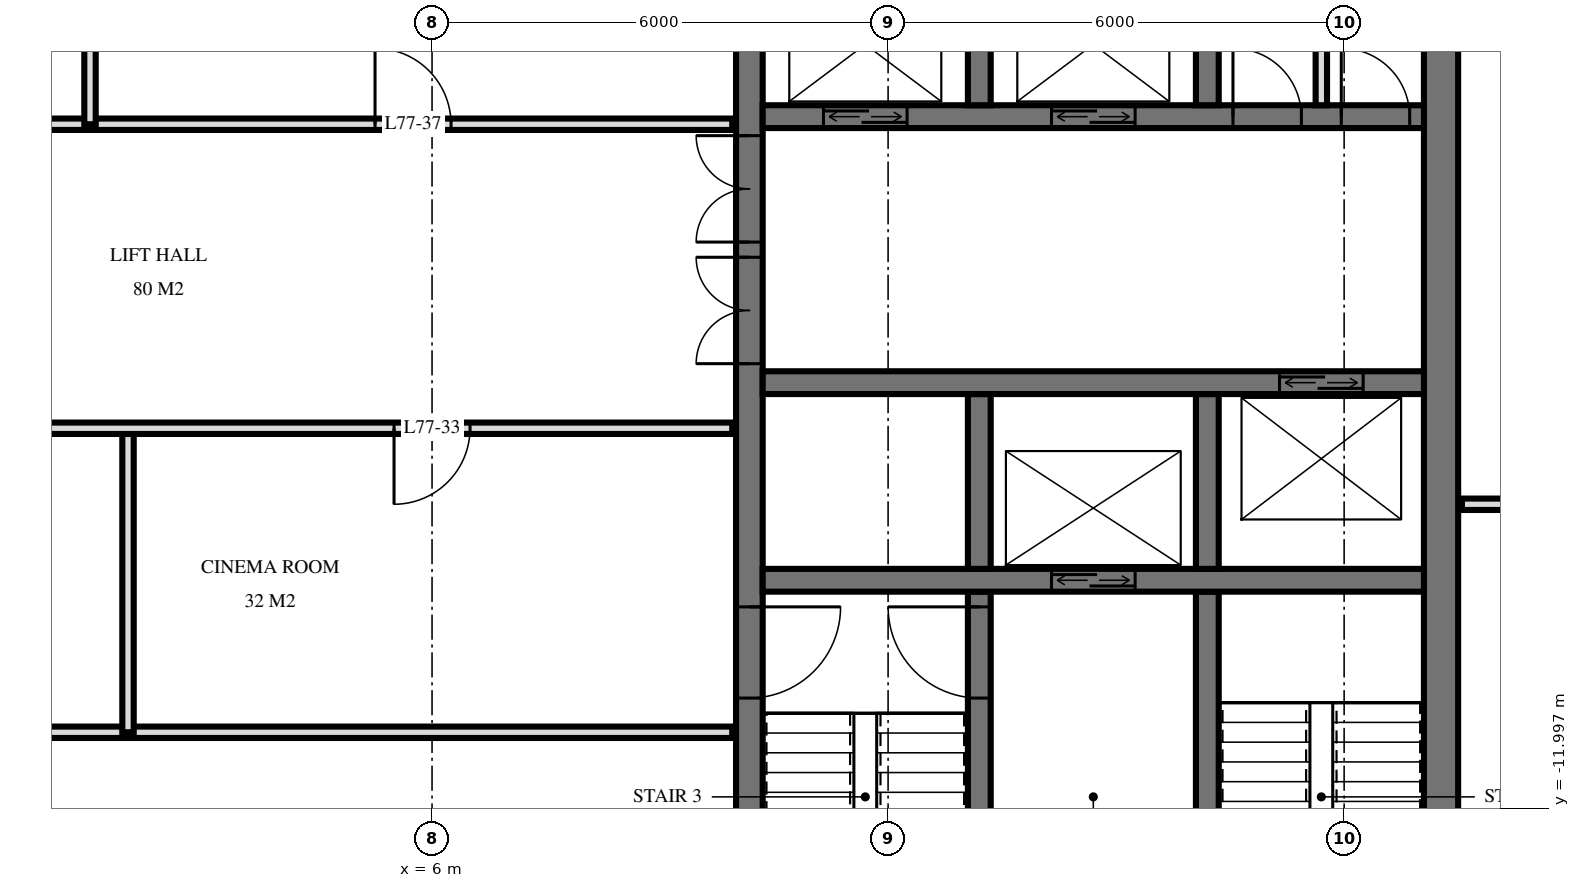
"""IFC4 building model, lengths in metres.
Left out: names, types, materials, properties, quantities, classifications, styles, units other than length and angle.
Written with IfcOpenShell. Run it as: python <this file> out.ifc"""

import sys

from ifc_helpers import new_model, si_unit, direction, frame, frame_2d, origin, place, context, subcontext, project, spatial, rectangle, extrude, element, fill, save


model = new_model("IFC4")
c1 = context("Model", 3, precision=1e-05, world=origin(), true_north=direction((0.0, 1.0)))
c2 = subcontext(c1, "Body", "Model", "MODEL_VIEW")
j1 = project(units=[si_unit("LENGTHUNIT", "METRE"), si_unit("PLANEANGLEUNIT", "RADIAN")], contexts=[c1])
p1 = place(None, origin())
s1 = spatial("IfcSite", under=j1, at=p1, CompositionType="ELEMENT")
p2 = place(p1, origin())
s2 = spatial("IfcBuilding", under=s1, at=p2, CompositionType="ELEMENT")
p3 = place(p2, frame((0.0, 0.0, 291.1)))
s3 = spatial("IfcBuildingStorey", under=s2, at=p3, CompositionType="ELEMENT", Elevation=291.1)
p4 = place(p3, frame((10.175, -14.55, 0.0), z_axis=(0.0, 0.0, 1.0), x_axis=(0.0, 1.0, 0.0)))
e1 = element("IfcWall", 1, at=p4, inside=s3, PredefinedType="SHEAR", context=c2, shape_type="SweptSolid", body=[
    extrude(rectangle(XDim=14.1, YDim=0.35, at=frame_2d((7.05, 0.0))), origin(), (0.0, 0.0, 1.0), 3.5),
])
p5 = place(p4, frame((8.4, 0.0, 0.0)))
e2 = element("IfcOpeningElement", 2, at=p5, cuts=e1, PredefinedType="OPENING", context=c2, shape_type="SweptSolid", body=[
    extrude(rectangle(XDim=1.4, YDim=2.4, at=frame_2d((0.7, 1.2))), frame((0.0, 0.185, 0.0), z_axis=(0.0, -1.0, 0.0), x_axis=(1.0, 0.0, 0.0)), (0.0, 0.0, 1.0), 0.37),
])
p6 = place(p4, frame((10.0, 0.0, 0.0)))
e3 = element("IfcOpeningElement", 3, at=p6, cuts=e1, PredefinedType="OPENING", context=c2, shape_type="SweptSolid", body=[
    extrude(rectangle(XDim=1.4, YDim=2.4, at=frame_2d((0.7, 1.2))), frame((0.0, 0.185, 0.0), z_axis=(0.0, -1.0, 0.0), x_axis=(1.0, 0.0, 0.0)), (0.0, 0.0, 1.0), 0.37),
])
p7 = place(p4, frame((4.0, 0.0, 0.0)))
e4 = element("IfcOpeningElement", 4, at=p7, cuts=e1, PredefinedType="OPENING", context=c2, shape_type="SweptSolid", body=[
    extrude(rectangle(XDim=1.2, YDim=2.1, at=frame_2d((0.6, 1.05))), frame((0.0, 0.185, 0.0), z_axis=(0.0, -1.0, 0.0), x_axis=(1.0, 0.0, 0.0)), (0.0, 0.0, 1.0), 0.37),
])
p8 = place(p3, frame((19.275, -14.55, 0.0), z_axis=(0.0, 0.0, 1.0), x_axis=(0.0, 1.0, 0.0)))
e5 = element("IfcWall", 5, at=p8, inside=s3, PredefinedType="SHEAR", context=c2, shape_type="SweptSolid", body=[
    extrude(rectangle(XDim=14.1, YDim=0.45, at=frame_2d((7.05, 0.0))), origin(), (0.0, 0.0, 1.0), 3.5),
])
p9 = place(p3, frame((10.35, -2.9, 0.0), z_axis=(0.0, 0.0, 1.0), x_axis=(1.0, 0.0, 0.0)))
e6 = element("IfcWall", 6, at=p9, inside=s3, PredefinedType="SHEAR", context=c2, shape_type="SweptSolid", body=[
    extrude(rectangle(XDim=8.7, YDim=0.3, at=frame_2d((4.35, 0.0))), origin(), (0.0, 0.0, 1.0), 3.5),
])
p10 = place(p9, frame((0.8, 0.0, 0.0)))
e7 = element("IfcOpeningElement", 7, at=p10, cuts=e6, PredefinedType="OPENING", context=c2, shape_type="SweptSolid", body=[
    extrude(rectangle(XDim=1.1, YDim=2.1, at=frame_2d((0.55, 1.05))), frame((0.0, 0.16, 0.0), z_axis=(0.0, -1.0, 0.0), x_axis=(1.0, 0.0, 0.0)), (0.0, 0.0, 1.0), 0.32),
])
p11 = place(p9, frame((3.8, 0.0, 0.0)))
e8 = element("IfcOpeningElement", 8, at=p11, cuts=e6, PredefinedType="OPENING", context=c2, shape_type="SweptSolid", body=[
    extrude(rectangle(XDim=1.1, YDim=2.1, at=frame_2d((0.55, 1.05))), frame((0.0, 0.16, 0.0), z_axis=(0.0, -1.0, 0.0), x_axis=(1.0, 0.0, 0.0)), (0.0, 0.0, 1.0), 0.32),
])
p12 = place(p9, frame((6.188, 0.0, 0.0)))
e9 = element("IfcOpeningElement", 9, at=p12, cuts=e6, PredefinedType="OPENING", context=c2, shape_type="SweptSolid", body=[
    extrude(rectangle(XDim=0.9, YDim=2.1, at=frame_2d((0.45, 1.05))), frame((0.0, 0.16, 0.0), z_axis=(0.0, -1.0, 0.0), x_axis=(1.0, 0.0, 0.0)), (0.0, 0.0, 1.0), 0.32),
])
p13 = place(p9, frame((7.613, 0.0, 0.0)))
e10 = element("IfcOpeningElement", 10, at=p13, cuts=e6, PredefinedType="OPENING", context=c2, shape_type="SweptSolid", body=[
    extrude(rectangle(XDim=0.9, YDim=2.1, at=frame_2d((0.45, 1.05))), frame((0.0, 0.16, 0.0), z_axis=(0.0, -1.0, 0.0), x_axis=(1.0, 0.0, 0.0)), (0.0, 0.0, 1.0), 0.32),
])
p14 = place(p3, frame((10.35, -6.4, 0.0), z_axis=(0.0, 0.0, 1.0), x_axis=(1.0, 0.0, 0.0)))
e11 = element("IfcWall", 11, at=p14, inside=s3, PredefinedType="SHEAR", context=c2, shape_type="SweptSolid", body=[
    extrude(rectangle(XDim=8.7, YDim=0.3, at=frame_2d((4.35, 0.0))), origin(), (0.0, 0.0, 1.0), 3.5),
])
p15 = place(p14, frame((6.8, 0.0, 0.0)))
e12 = element("IfcOpeningElement", 12, at=p15, cuts=e11, PredefinedType="OPENING", context=c2, shape_type="SweptSolid", body=[
    extrude(rectangle(XDim=1.1, YDim=2.1, at=frame_2d((0.55, 1.05))), frame((0.0, 0.16, 0.0), z_axis=(0.0, -1.0, 0.0), x_axis=(1.0, 0.0, 0.0)), (0.0, 0.0, 1.0), 0.32),
])
p16 = place(p3, frame((10.35, -9.0, 0.0), z_axis=(0.0, 0.0, 1.0), x_axis=(1.0, 0.0, 0.0)))
e13 = element("IfcWall", 13, at=p16, inside=s3, PredefinedType="SHEAR", context=c2, shape_type="SweptSolid", body=[
    extrude(rectangle(XDim=8.7, YDim=0.3, at=frame_2d((4.35, 0.0))), origin(), (0.0, 0.0, 1.0), 3.5),
])
p17 = place(p16, frame((3.8, 0.0, 0.0)))
e14 = element("IfcOpeningElement", 14, at=p17, cuts=e13, PredefinedType="OPENING", context=c2, shape_type="SweptSolid", body=[
    extrude(rectangle(XDim=1.1, YDim=2.1, at=frame_2d((0.55, 1.05))), frame((0.0, 0.16, 0.0), z_axis=(0.0, -1.0, 0.0), x_axis=(1.0, 0.0, 0.0)), (0.0, 0.0, 1.0), 0.32),
])
for number, where, z_axis, x_axis in (
    (15, (13.2, -2.75, 0.0), (0.0, 0.0, 1.0), (0.0, 1.0, 0.0)),
    (16, (13.2, -8.85, 0.0), (0.0, 0.0, 1.0), (0.0, 1.0, 0.0)),
):
    element("IfcWall", number, at=place(p3, frame(where, z_axis=z_axis, x_axis=x_axis)), inside=s3, PredefinedType="SHEAR", context=c2, shape_type="SweptSolid", body=[
        extrude(rectangle(XDim=2.3, YDim=0.3, at=frame_2d((1.15, 0.0))), origin(), (0.0, 0.0, 1.0), 3.5),
    ])
p18 = place(p3, frame((13.2, -14.55, 0.0), z_axis=(0.0, 0.0, 1.0), x_axis=(0.0, 1.0, 0.0)))
e17 = element("IfcWall", 17, at=p18, inside=s3, PredefinedType="SHEAR", context=c2, shape_type="SweptSolid", body=[
    extrude(rectangle(XDim=5.4, YDim=0.3, at=frame_2d((2.7, 0.0))), origin(), (0.0, 0.0, 1.0), 3.5),
])
p19 = place(p18, frame((4.0, 0.0, 0.0)))
e18 = element("IfcOpeningElement", 18, at=p19, cuts=e17, PredefinedType="OPENING", context=c2, shape_type="SweptSolid", body=[
    extrude(rectangle(XDim=1.2, YDim=2.1, at=frame_2d((0.6, 1.05))), frame((0.0, 0.16, 0.0), z_axis=(0.0, -1.0, 0.0), x_axis=(1.0, 0.0, 0.0)), (0.0, 0.0, 1.0), 0.32),
])
for number, where, z_axis, x_axis in (
    (19, (16.2, -2.75, 0.0), (0.0, 0.0, 1.0), (0.0, 1.0, 0.0)),
    (20, (16.2, -8.85, 0.0), (0.0, 0.0, 1.0), (0.0, 1.0, 0.0)),
):
    element("IfcWall", number, at=place(p3, frame(where, z_axis=z_axis, x_axis=x_axis)), inside=s3, PredefinedType="SHEAR", context=c2, shape_type="SweptSolid", body=[
        extrude(rectangle(XDim=2.3, YDim=0.3, at=frame_2d((1.15, 0.0))), origin(), (0.0, 0.0, 1.0), 3.5),
    ])
p20 = place(p3, frame((16.2, -14.55, 0.0), z_axis=(0.0, 0.0, 1.0), x_axis=(0.0, 1.0, 0.0)))
e21 = element("IfcWall", 21, at=p20, inside=s3, PredefinedType="SHEAR", context=c2, shape_type="SweptSolid", body=[
    extrude(rectangle(XDim=5.4, YDim=0.3, at=frame_2d((2.7, 0.0))), origin(), (0.0, 0.0, 1.0), 3.5),
])
p21 = place(p20, frame((0.2, 0.0, 0.0)))
e22 = element("IfcOpeningElement", 22, at=p21, cuts=e21, PredefinedType="OPENING", context=c2, shape_type="SweptSolid", body=[
    extrude(rectangle(XDim=1.2, YDim=2.1, at=frame_2d((0.6, 1.05))), frame((0.0, 0.16, 0.0), z_axis=(0.0, -1.0, 0.0), x_axis=(1.0, 0.0, 0.0)), (0.0, 0.0, 1.0), 0.32),
])
p22 = place(p3, frame((17.7, -2.75, 0.0), z_axis=(0.0, 0.0, 1.0), x_axis=(0.0, 1.0, 0.0)))
e23 = element("IfcWall", 23, at=p22, inside=s3, PredefinedType="PARTITIONING", context=c2, shape_type="SweptSolid", body=[
    extrude(rectangle(XDim=2.3, YDim=0.15, at=frame_2d((1.15, 0.0))), origin(), (0.0, 0.0, 1.0), 3.2),
])
p23 = place(p3, frame((2.0, -11.0, 0.0), z_axis=(0.0, 0.0, 1.0), x_axis=(0.0, 1.0, 0.0)))
e24 = element("IfcWall", 24, at=p23, inside=s3, PredefinedType="PARTITIONING", context=c2, shape_type="SweptSolid", body=[
    extrude(rectangle(XDim=4.0, YDim=0.15, at=frame_2d((2.0, 0.0))), origin(), (0.0, 0.0, 1.0), 3.22),
])
p24 = place(p3, frame((1.5, -3.0, 0.0), z_axis=(0.0, 0.0, 1.0), x_axis=(0.0, 1.0, 0.0)))
e25 = element("IfcWall", 25, at=p24, inside=s3, PredefinedType="PARTITIONING", context=c2, shape_type="SweptSolid", body=[
    extrude(rectangle(XDim=4.02, YDim=0.15, at=frame_2d((2.01, 0.0))), origin(), (0.0, 0.0, 1.0), 3.22),
])
p25 = place(p3, frame((-9.95, -11.0, 0.0), z_axis=(0.0, 0.0, 1.0), x_axis=(1.0, 0.0, 0.0)))
e26 = element("IfcWall", 26, at=p25, inside=s3, PredefinedType="PARTITIONING", context=c2, shape_type="SweptSolid", body=[
    extrude(rectangle(XDim=19.9, YDim=0.15, at=frame_2d((9.95, 0.0))), origin(), (0.0, 0.0, 1.0), 3.22),
])
p26 = place(p25, frame((9.45, 0.0, 0.0)))
e27 = element("IfcOpeningElement", 27, at=p26, cuts=e26, PredefinedType="OPENING", context=c2, shape_type="SweptSolid", body=[
    extrude(rectangle(XDim=1.0, YDim=2.1, at=frame_2d((0.5, 1.05))), frame((0.0, 0.085, 0.0), z_axis=(0.0, -1.0, 0.0), x_axis=(1.0, 0.0, 0.0)), (0.0, 0.0, 1.0), 0.17),
])
p27 = place(p25, frame((3.45, 0.0, 0.0)))
e28 = element("IfcOpeningElement", 28, at=p27, cuts=e26, PredefinedType="OPENING", context=c2, shape_type="SweptSolid", body=[
    extrude(rectangle(XDim=1.0, YDim=2.1, at=frame_2d((0.5, 1.05))), frame((0.0, 0.085, 0.0), z_axis=(0.0, -1.0, 0.0), x_axis=(1.0, 0.0, 0.0)), (0.0, 0.0, 1.0), 0.17),
])
p28 = place(p3, frame((19.55, -8.0, 0.0), z_axis=(0.0, 0.0, 1.0), x_axis=(1.0, 0.0, 0.0)))
e29 = element("IfcWall", 29, at=p28, inside=s3, PredefinedType="PARTITIONING", context=c2, shape_type="SweptSolid", body=[
    extrude(rectangle(XDim=3.37, YDim=0.15, at=frame_2d((1.685, 0.0))), origin(), (0.0, 0.0, 1.0), 3.22),
])
p29 = place(p28, frame((1.3, 0.0, 0.0)))
e30 = element("IfcOpeningElement", 30, at=p29, cuts=e29, PredefinedType="OPENING", context=c2, shape_type="SweptSolid", body=[
    extrude(rectangle(XDim=0.9, YDim=2.1, at=frame_2d((0.45, 1.05))), frame((0.0, 0.085, 0.0), z_axis=(0.0, -1.0, 0.0), x_axis=(1.0, 0.0, 0.0)), (0.0, 0.0, 1.0), 0.17),
])
p30 = place(p3, frame((-9.95, -7.0, 0.0), z_axis=(0.0, 0.0, 1.0), x_axis=(1.0, 0.0, 0.0)))
e31 = element("IfcWall", 31, at=p30, inside=s3, PredefinedType="PARTITIONING", context=c2, shape_type="SweptSolid", body=[
    extrude(rectangle(XDim=19.9, YDim=0.15, at=frame_2d((9.95, 0.0))), origin(), (0.0, 0.0, 1.0), 3.22),
])
p31 = place(p30, frame((9.45, 0.0, 0.0)))
e32 = element("IfcOpeningElement", 32, at=p31, cuts=e31, PredefinedType="OPENING", context=c2, shape_type="SweptSolid", body=[
    extrude(rectangle(XDim=1.0, YDim=2.1, at=frame_2d((0.5, 1.05))), frame((0.0, 0.085, 0.0), z_axis=(0.0, -1.0, 0.0), x_axis=(1.0, 0.0, 0.0)), (0.0, 0.0, 1.0), 0.17),
])
p32 = place(p30, frame((15.45, 0.0, 0.0)))
e33 = element("IfcOpeningElement", 33, at=p32, cuts=e31, PredefinedType="OPENING", context=c2, shape_type="SweptSolid", body=[
    extrude(rectangle(XDim=1.0, YDim=2.1, at=frame_2d((0.5, 1.05))), frame((0.0, 0.085, 0.0), z_axis=(0.0, -1.0, 0.0), x_axis=(1.0, 0.0, 0.0)), (0.0, 0.0, 1.0), 0.17),
])
p33 = place(p3, frame((-9.95, -3.0, 0.0), z_axis=(0.0, 0.0, 1.0), x_axis=(1.0, 0.0, 0.0)))
e34 = element("IfcWall", 34, at=p33, inside=s3, PredefinedType="PARTITIONING", context=c2, shape_type="SweptSolid", body=[
    extrude(rectangle(XDim=19.9, YDim=0.15, at=frame_2d((9.95, 0.0))), origin(), (0.0, 0.0, 1.0), 3.22),
])
p34 = place(p33, frame((0.95, 0.0, 0.0)))
e35 = element("IfcOpeningElement", 35, at=p34, cuts=e34, PredefinedType="OPENING", context=c2, shape_type="SweptSolid", body=[
    extrude(rectangle(XDim=1.0, YDim=2.1, at=frame_2d((0.5, 1.05))), frame((0.0, 0.085, 0.0), z_axis=(0.0, -1.0, 0.0), x_axis=(1.0, 0.0, 0.0)), (0.0, 0.0, 1.0), 0.17),
])
p35 = place(p33, frame((3.7, 0.0, 0.0)))
e36 = element("IfcOpeningElement", 36, at=p35, cuts=e34, PredefinedType="OPENING", context=c2, shape_type="SweptSolid", body=[
    extrude(rectangle(XDim=1.0, YDim=2.1, at=frame_2d((0.5, 1.05))), frame((0.0, 0.085, 0.0), z_axis=(0.0, -1.0, 0.0), x_axis=(1.0, 0.0, 0.0)), (0.0, 0.0, 1.0), 0.17),
])
p36 = place(p33, frame((7.95, 0.0, 0.0)))
e37 = element("IfcOpeningElement", 37, at=p36, cuts=e34, PredefinedType="OPENING", context=c2, shape_type="SweptSolid", body=[
    extrude(rectangle(XDim=1.0, YDim=2.1, at=frame_2d((0.5, 1.05))), frame((0.0, 0.085, 0.0), z_axis=(0.0, -1.0, 0.0), x_axis=(1.0, 0.0, 0.0)), (0.0, 0.0, 1.0), 0.17),
])
p37 = place(p33, frame((15.2, 0.0, 0.0)))
e38 = element("IfcOpeningElement", 38, at=p37, cuts=e34, PredefinedType="OPENING", context=c2, shape_type="SweptSolid", body=[
    extrude(rectangle(XDim=1.0, YDim=2.1, at=frame_2d((0.5, 1.05))), frame((0.0, 0.085, 0.0), z_axis=(0.0, -1.0, 0.0), x_axis=(1.0, 0.0, 0.0)), (0.0, 0.0, 1.0), 0.17),
])
p38 = place(p10, origin())
e39 = element("IfcDoor", 39, at=p38, inside=s3, OperationType="DOUBLE_DOOR_SLIDING", PredefinedType="USERDEFINED", context=c2, shape_type="SweptSolid", body=[
    extrude(rectangle(XDim=1.1, YDim=2.1, at=frame_2d((0.55, 1.05))), frame((0.0, 0.025, 0.0), z_axis=(0.0, -1.0, 0.0), x_axis=(1.0, 0.0, 0.0)), (0.0, 0.0, 1.0), 0.05),
])
fill(e7, e39)
p39 = place(p11, origin())
e40 = element("IfcDoor", 40, at=p39, inside=s3, OperationType="DOUBLE_DOOR_SLIDING", PredefinedType="USERDEFINED", context=c2, shape_type="SweptSolid", body=[
    extrude(rectangle(XDim=1.1, YDim=2.1, at=frame_2d((0.55, 1.05))), frame((0.0, 0.025, 0.0), z_axis=(0.0, -1.0, 0.0), x_axis=(1.0, 0.0, 0.0)), (0.0, 0.0, 1.0), 0.05),
])
fill(e8, e40)
p40 = place(p17, origin())
e41 = element("IfcDoor", 41, at=p40, inside=s3, OperationType="DOUBLE_DOOR_SLIDING", PredefinedType="USERDEFINED", context=c2, shape_type="SweptSolid", body=[
    extrude(rectangle(XDim=1.1, YDim=2.1, at=frame_2d((0.55, 1.05))), frame((0.0, 0.025, 0.0), z_axis=(0.0, -1.0, 0.0), x_axis=(1.0, 0.0, 0.0)), (0.0, 0.0, 1.0), 0.05),
])
fill(e14, e41)
p41 = place(p15, origin())
e42 = element("IfcDoor", 42, at=p41, inside=s3, OperationType="DOUBLE_DOOR_SLIDING", PredefinedType="USERDEFINED", context=c2, shape_type="SweptSolid", body=[
    extrude(rectangle(XDim=1.1, YDim=2.1, at=frame_2d((0.55, 1.05))), frame((0.0, 0.025, 0.0), z_axis=(0.0, -1.0, 0.0), x_axis=(1.0, 0.0, 0.0)), (0.0, 0.0, 1.0), 0.05),
])
fill(e12, e42)
p42 = place(p5, origin())
e43 = element("IfcDoor", 43, at=p42, inside=s3, OperationType="DOUBLE_DOOR_SINGLE_SWING", PredefinedType="DOOR", context=c2, shape_type="SweptSolid", body=[
    extrude(rectangle(XDim=1.4, YDim=2.4, at=frame_2d((0.7, 1.2))), frame((0.0, 0.025, 0.0), z_axis=(0.0, -1.0, 0.0), x_axis=(1.0, 0.0, 0.0)), (0.0, 0.0, 1.0), 0.05),
])
fill(e2, e43)
p43 = place(p6, origin())
e44 = element("IfcDoor", 44, at=p43, inside=s3, OperationType="DOUBLE_DOOR_SINGLE_SWING", PredefinedType="DOOR", context=c2, shape_type="SweptSolid", body=[
    extrude(rectangle(XDim=1.4, YDim=2.4, at=frame_2d((0.7, 1.2))), frame((0.0, 0.025, 0.0), z_axis=(0.0, -1.0, 0.0), x_axis=(1.0, 0.0, 0.0)), (0.0, 0.0, 1.0), 0.05),
])
fill(e3, e44)
p44 = place(p7, frame((0.6, 0.0, 0.0), z_axis=(0.0, 0.0, 1.0), x_axis=(-1.0, 0.0, 0.0)))
e45 = element("IfcDoor", 45, at=p44, inside=s3, OperationType="SINGLE_SWING_RIGHT", PredefinedType="DOOR", context=c2, shape_type="SweptSolid", body=[
    extrude(rectangle(XDim=1.2, YDim=2.1, at=frame_2d((0.0, 1.05))), frame((0.0, -0.025, 0.0), z_axis=(0.0, 1.0, 0.0), x_axis=(-1.0, 0.0, 0.0)), (0.0, 0.0, 1.0), 0.05),
])
fill(e4, e45)
p45 = place(p12, origin())
e46 = element("IfcDoor", 46, at=p45, inside=s3, OperationType="SINGLE_SWING_RIGHT", PredefinedType="DOOR", context=c2, shape_type="SweptSolid", body=[
    extrude(rectangle(XDim=0.9, YDim=2.1, at=frame_2d((0.45, 1.05))), frame((0.0, 0.025, 0.0), z_axis=(0.0, -1.0, 0.0), x_axis=(1.0, 0.0, 0.0)), (0.0, 0.0, 1.0), 0.05),
])
fill(e9, e46)
p46 = place(p13, origin())
e47 = element("IfcDoor", 47, at=p46, inside=s3, OperationType="SINGLE_SWING_RIGHT", PredefinedType="DOOR", context=c2, shape_type="SweptSolid", body=[
    extrude(rectangle(XDim=0.9, YDim=2.1, at=frame_2d((0.45, 1.05))), frame((0.0, 0.025, 0.0), z_axis=(0.0, -1.0, 0.0), x_axis=(1.0, 0.0, 0.0)), (0.0, 0.0, 1.0), 0.05),
])
fill(e10, e47)
p47 = place(p19, origin())
e48 = element("IfcDoor", 48, at=p47, inside=s3, OperationType="SINGLE_SWING_LEFT", PredefinedType="DOOR", context=c2, shape_type="SweptSolid", body=[
    extrude(rectangle(XDim=1.2, YDim=2.1, at=frame_2d((0.6, 1.05))), frame((0.0, 0.025, 0.0), z_axis=(0.0, -1.0, 0.0), x_axis=(1.0, 0.0, 0.0)), (0.0, 0.0, 1.0), 0.05),
])
fill(e18, e48)
p48 = place(p32, frame((0.5, 0.0, 0.0), z_axis=(0.0, 0.0, 1.0), x_axis=(-1.0, 0.0, 0.0)))
e49 = element("IfcDoor", 49, at=p48, inside=s3, OperationType="SINGLE_SWING_LEFT", PredefinedType="DOOR", context=c2, shape_type="SweptSolid", body=[
    extrude(rectangle(XDim=1.0, YDim=2.1, at=frame_2d((0.0, 1.05))), frame((0.0, -0.025, 0.0), z_axis=(0.0, 1.0, 0.0), x_axis=(-1.0, 0.0, 0.0)), (0.0, 0.0, 1.0), 0.05),
])
fill(e33, e49)
p49 = place(p37, origin())
e50 = element("IfcDoor", 50, at=p49, inside=s3, OperationType="SINGLE_SWING_RIGHT", PredefinedType="DOOR", context=c2, shape_type="SweptSolid", body=[
    extrude(rectangle(XDim=1.0, YDim=2.1, at=frame_2d((0.5, 1.05))), frame((0.0, 0.025, 0.0), z_axis=(0.0, -1.0, 0.0), x_axis=(1.0, 0.0, 0.0)), (0.0, 0.0, 1.0), 0.05),
])
fill(e38, e50)
save(model, sys.argv[1])
